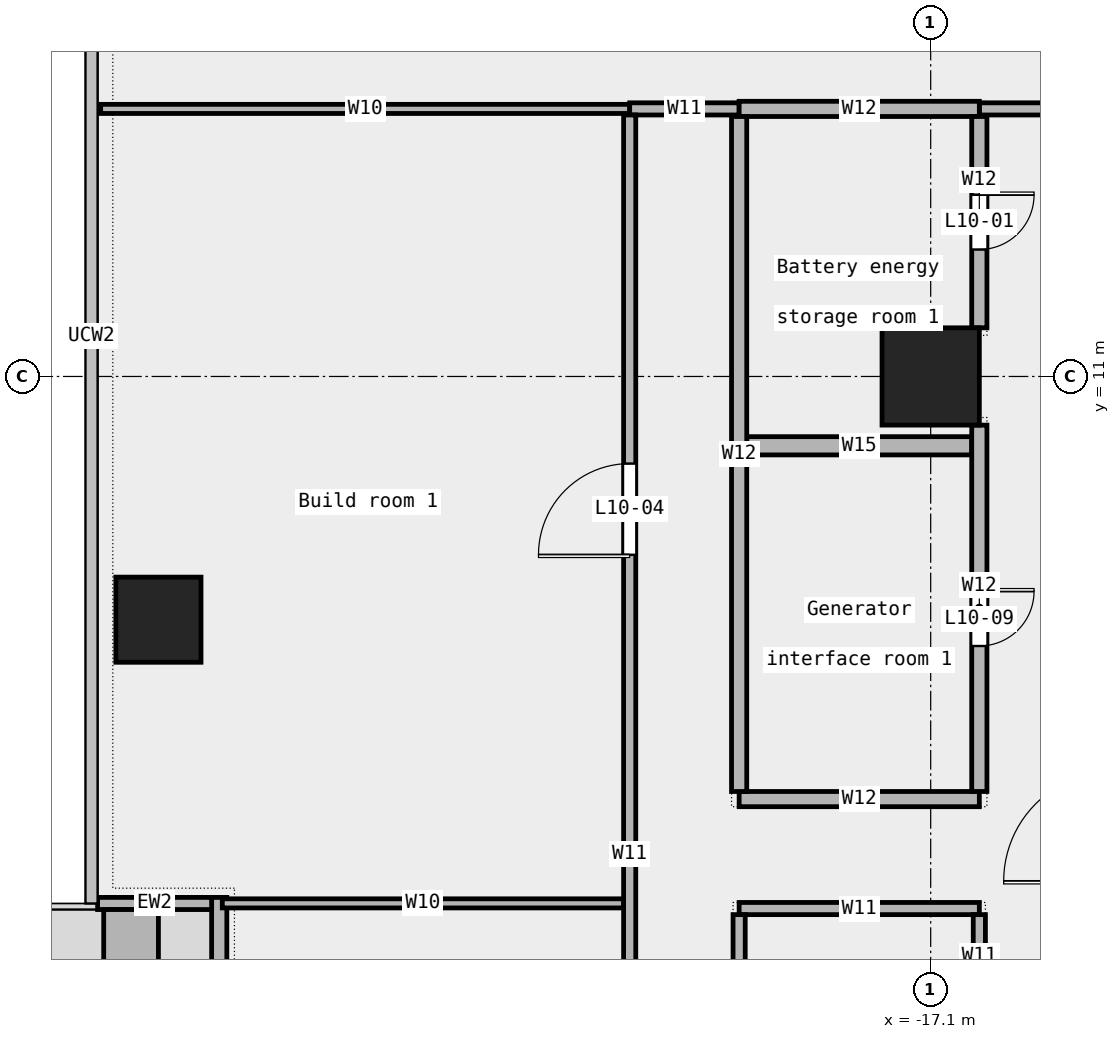
"""IFC4 building model, lengths in metres.
Left out: names, types, materials, properties, quantities, classifications, styles, units other than length and angle.
Written with IfcOpenShell. Run it as: python <this file> out.ifc"""

import sys

from ifc_helpers import new_model, si_unit, direction, frame, frame_2d, origin, origin_2d, place, context, subcontext, project, spatial, rectangle, extrude, element, fill, save


model = new_model("IFC4")
c1 = context("Model", 3, precision=1e-05, world=origin(), true_north=direction((0.0, 1.0)))
c2 = subcontext(c1, "Body", "Model", "MODEL_VIEW")
j1 = project(units=[si_unit("LENGTHUNIT", "METRE"), si_unit("PLANEANGLEUNIT", "RADIAN")], contexts=[c1])
p1 = place(None, origin())
s1 = spatial("IfcSite", under=j1, at=p1, CompositionType="ELEMENT")
p2 = place(p1, origin())
s2 = spatial("IfcBuilding", under=s1, at=p2, CompositionType="ELEMENT")
p3 = place(p2, frame((0.0, 0.0, 55.0)))
s3 = spatial("IfcBuildingStorey", under=s2, at=p3, CompositionType="ELEMENT", Elevation=55.0)
p4 = place(p3, frame((-29.8, 7.0, 0.0), z_axis=(0.0, 0.0, 1.0), x_axis=(1.0, 0.0, 0.0)))
e1 = element("IfcColumn", 1, at=p4, inside=s3, PredefinedType="COLUMN", context=c2, shape_type="SweptSolid", body=[
    extrude(rectangle(XDim=1.4, YDim=1.4, at=origin_2d()), origin(), (0.0, 0.0, 1.0), 4.35),
])
p5 = place(p3, frame((-17.1, 11.0, 0.0), z_axis=(0.0, 0.0, 1.0), x_axis=(1.0, 0.0, 0.0)))
e2 = element("IfcColumn", 2, at=p5, inside=s3, PredefinedType="COLUMN", context=c2, shape_type="SweptSolid", body=[
    extrude(rectangle(XDim=1.6, YDim=1.6, at=origin_2d()), origin(), (0.0, 0.0, 1.0), 4.35),
])
p6 = place(p3, frame((-28.8, 2.433, 0.0), z_axis=(0.0, 0.0, 1.0), x_axis=(0.0, -1.0, 0.0)))
e3 = element("IfcWall", 3, at=p6, inside=s3, PredefinedType="STANDARD", context=c2, shape_type="SweptSolid", body=[
    extrude(rectangle(XDim=14.2, YDim=0.25, at=frame_2d((7.1, 0.0))), origin(), (0.0, 0.0, 1.0), 4.35),
])
p7 = place(p6, frame((1.75, 0.0, 0.45)))
e4 = element("IfcOpeningElement", 4, at=p7, cuts=e3, PredefinedType="OPENING", context=c2, shape_type="SweptSolid", body=[
    extrude(rectangle(XDim=1.5, YDim=3.0, at=frame_2d((0.75, 1.5))), frame((0.0, 0.137, 0.0), z_axis=(0.0, -1.0, 0.0), x_axis=(1.0, 0.0, 0.0)), (0.0, 0.0, 1.0), 0.274),
])
p8 = place(p6, frame((6.25, 0.0, 0.0)))
e5 = element("IfcOpeningElement", 5, at=p8, cuts=e3, PredefinedType="OPENING", context=c2, shape_type="SweptSolid", body=[
    extrude(rectangle(XDim=1.8, YDim=2.4, at=frame_2d((0.9, 1.2))), frame((0.0, 0.137, 0.0), z_axis=(0.0, -1.0, 0.0), x_axis=(1.0, 0.0, 0.0)), (0.0, 0.0, 1.0), 0.274),
])
p9 = place(p6, frame((11.0, 0.0, 0.45)))
e6 = element("IfcOpeningElement", 6, at=p9, cuts=e3, PredefinedType="OPENING", context=c2, shape_type="SweptSolid", body=[
    extrude(rectangle(XDim=1.5, YDim=3.0, at=frame_2d((0.75, 1.5))), frame((0.0, 0.137, 0.0), z_axis=(0.0, -1.0, 0.0), x_axis=(1.0, 0.0, 0.0)), (0.0, 0.0, 1.0), 0.274),
])
p10 = place(p3, frame((-30.8, 2.333, 0.0), z_axis=(0.0, 0.0, 1.0), x_axis=(1.0, 0.0, 0.0)))
e7 = element("IfcWall", 7, at=p10, inside=s3, PredefinedType="STANDARD", context=c2, shape_type="SweptSolid", body=[
    extrude(rectangle(XDim=1.875, YDim=0.2, at=frame_2d((0.938, 0.0))), origin(), (0.0, 0.0, 1.0), 4.35),
])
p11 = place(p3, frame((-30.25, 2.233, 0.0), z_axis=(0.0, 0.0, 1.0), x_axis=(0.0, -1.0, 0.0)))
e8 = element("IfcWall", 8, at=p11, inside=s3, PredefinedType="STANDARD", context=c2, shape_type="SweptSolid", body=[
    extrude(rectangle(XDim=3.6, YDim=0.9, at=frame_2d((1.8, 0.0))), origin(), (0.0, 0.0, 1.0), 0.7),
])
p12 = place(p3, frame((-20.25, 2.25, 0.0), z_axis=(0.0, 0.0, 1.0), x_axis=(1.0, 0.0, 0.0)))
e9 = element("IfcWall", 9, at=p12, inside=s3, PredefinedType="PARTITIONING", context=c2, shape_type="SweptSolid", body=[
    extrude(rectangle(XDim=3.95, YDim=0.2, at=frame_2d((1.975, 0.0))), origin(), (0.0, 0.0, 1.0), 4.35),
])
p13 = place(p3, frame((-28.75, 2.335, 0.0), z_axis=(0.0, 0.0, 1.0), x_axis=(1.0, 0.0, 0.0)))
e10 = element("IfcWall", 10, at=p13, inside=s3, PredefinedType="PARTITIONING", context=c2, shape_type="SweptSolid", body=[
    extrude(rectangle(XDim=6.6, YDim=0.15, at=frame_2d((3.3, 0.0))), origin(), (0.0, 0.0, 1.0), 4.35),
])
p14 = place(p3, frame((-20.25, 4.05, 0.0), z_axis=(0.0, 0.0, 1.0), x_axis=(1.0, 0.0, 0.0)))
e11 = element("IfcWall", 11, at=p14, inside=s3, PredefinedType="PARTITIONING", context=c2, shape_type="SweptSolid", body=[
    extrude(rectangle(XDim=3.95, YDim=0.25, at=frame_2d((1.975, 0.0))), origin(), (0.0, 0.0, 1.0), 4.35),
])
p15 = place(p3, frame((-20.125, 9.86, 0.0), z_axis=(0.0, 0.0, 1.0), x_axis=(1.0, 0.0, 0.0)))
e12 = element("IfcWall", 12, at=p15, inside=s3, PredefinedType="PARTITIONING", context=c2, shape_type="SweptSolid", body=[
    extrude(rectangle(XDim=3.7, YDim=0.3, at=frame_2d((1.85, 0.0))), origin(), (0.0, 0.0, 1.0), 4.35),
])
p16 = place(p3, frame((-30.75, 15.4, 0.0), z_axis=(0.0, 0.0, 1.0), x_axis=(1.0, 0.0, 0.0)))
e13 = element("IfcWall", 13, at=p16, inside=s3, PredefinedType="PARTITIONING", context=c2, shape_type="SweptSolid", body=[
    extrude(rectangle(XDim=8.7, YDim=0.15, at=frame_2d((4.35, 0.0))), origin(), (0.0, 0.0, 1.0), 4.35),
])
p17 = place(p3, frame((-22.05, 15.4, 0.0), z_axis=(0.0, 0.0, 1.0), x_axis=(1.0, 0.0, 0.0)))
e14 = element("IfcWall", 14, at=p17, inside=s3, PredefinedType="PARTITIONING", context=c2, shape_type="SweptSolid", body=[
    extrude(rectangle(XDim=1.8, YDim=0.2, at=frame_2d((0.9, 0.0))), origin(), (0.0, 0.0, 1.0), 4.35),
])
p18 = place(p3, frame((-16.3, 15.4, 0.0), z_axis=(0.0, 0.0, 1.0), x_axis=(1.0, 0.0, 0.0)))
e15 = element("IfcWall", 15, at=p18, inside=s3, PredefinedType="PARTITIONING", context=c2, shape_type="SweptSolid", body=[
    extrude(rectangle(XDim=6.115, YDim=0.2, at=frame_2d((3.058, 0.0))), origin(), (0.0, 0.0, 1.0), 4.35),
])
p19 = place(p18, frame((2.157, 0.0, 0.0)))
e16 = element("IfcOpeningElement", 16, at=p19, cuts=e15, PredefinedType="OPENING", context=c2, shape_type="SweptSolid", body=[
    extrude(rectangle(XDim=1.8, YDim=2.1, at=frame_2d((0.9, 1.05))), frame((0.0, 0.112, 0.0), z_axis=(0.0, -1.0, 0.0), x_axis=(1.0, 0.0, 0.0)), (0.0, 0.0, 1.0), 0.224),
])
p20 = place(p3, frame((-20.25, 15.4, 0.0), z_axis=(0.0, 0.0, 1.0), x_axis=(1.0, 0.0, 0.0)))
e17 = element("IfcWall", 17, at=p20, inside=s3, PredefinedType="PARTITIONING", context=c2, shape_type="SweptSolid", body=[
    extrude(rectangle(XDim=3.95, YDim=0.25, at=frame_2d((1.975, 0.0))), origin(), (0.0, 0.0, 1.0), 4.35),
])
p21 = place(p3, frame((-22.05, -9.0, 0.0), z_axis=(0.0, 0.0, 1.0), x_axis=(0.0, 1.0, 0.0)))
e18 = element("IfcWall", 18, at=p21, inside=s3, PredefinedType="PARTITIONING", context=c2, shape_type="SweptSolid", body=[
    extrude(rectangle(XDim=24.3, YDim=0.2, at=frame_2d((12.15, 0.0))), origin(), (0.0, 0.0, 1.0), 4.35),
])
p22 = place(p21, frame((17.067, 0.0, 0.0)))
e19 = element("IfcOpeningElement", 19, at=p22, cuts=e18, PredefinedType="OPENING", context=c2, shape_type="SweptSolid", body=[
    extrude(rectangle(XDim=1.5, YDim=2.1, at=frame_2d((0.75, 1.05))), frame((0.0, 0.112, 0.0), z_axis=(0.0, -1.0, 0.0), x_axis=(1.0, 0.0, 0.0)), (0.0, 0.0, 1.0), 0.224),
])
p23 = place(p21, frame((4.768, 0.0, 0.0)))
e20 = element("IfcOpeningElement", 20, at=p23, cuts=e18, PredefinedType="OPENING", context=c2, shape_type="SweptSolid", body=[
    extrude(rectangle(XDim=1.8, YDim=2.1, at=frame_2d((0.9, 1.05))), frame((0.0, 0.112, 0.0), z_axis=(0.0, -1.0, 0.0), x_axis=(1.0, 0.0, 0.0)), (0.0, 0.0, 1.0), 0.224),
])
p24 = place(p3, frame((-20.25, -9.0, 0.0), z_axis=(0.0, 0.0, 1.0), x_axis=(0.0, 1.0, 0.0)))
e21 = element("IfcWall", 21, at=p24, inside=s3, PredefinedType="PARTITIONING", context=c2, shape_type="SweptSolid", body=[
    extrude(rectangle(XDim=11.15, YDim=0.2, at=frame_2d((5.575, 0.0))), origin(), (0.0, 0.0, 1.0), 4.35),
])
p25 = place(p3, frame((-20.25, 4.175, 0.0), z_axis=(0.0, 0.0, 1.0), x_axis=(0.0, 1.0, 0.0)))
e22 = element("IfcWall", 22, at=p25, inside=s3, PredefinedType="PARTITIONING", context=c2, shape_type="SweptSolid", body=[
    extrude(rectangle(XDim=11.1, YDim=0.25, at=frame_2d((5.55, 0.0))), origin(), (0.0, 0.0, 1.0), 4.35),
])
p26 = place(p3, frame((-16.3, 0.8, 0.0), z_axis=(0.0, 0.0, 1.0), x_axis=(0.0, 1.0, 0.0)))
e23 = element("IfcWall", 23, at=p26, inside=s3, PredefinedType="PARTITIONING", context=c2, shape_type="SweptSolid", body=[
    extrude(rectangle(XDim=1.35, YDim=0.2, at=frame_2d((0.675, 0.0))), origin(), (0.0, 0.0, 1.0), 4.35),
])
p27 = place(p3, frame((-16.3, 4.175, 0.0), z_axis=(0.0, 0.0, 1.0), x_axis=(0.0, 1.0, 0.0)))
e24 = element("IfcWall", 24, at=p27, inside=s3, PredefinedType="PARTITIONING", context=c2, shape_type="SweptSolid", body=[
    extrude(rectangle(XDim=6.025, YDim=0.25, at=frame_2d((3.012, 0.0))), origin(), (0.0, 0.0, 1.0), 4.35),
])
p28 = place(p27, frame((2.393, 0.0, 0.0)))
e25 = element("IfcOpeningElement", 25, at=p28, cuts=e24, PredefinedType="OPENING", context=c2, shape_type="SweptSolid", body=[
    extrude(rectangle(XDim=0.9, YDim=2.1, at=frame_2d((0.45, 1.05))), frame((0.0, 0.137, 0.0), z_axis=(0.0, -1.0, 0.0), x_axis=(1.0, 0.0, 0.0)), (0.0, 0.0, 1.0), 0.274),
])
p29 = place(p3, frame((-16.3, 11.8, 0.0), z_axis=(0.0, 0.0, 1.0), x_axis=(0.0, 1.0, 0.0)))
e26 = element("IfcWall", 26, at=p29, inside=s3, PredefinedType="PARTITIONING", context=c2, shape_type="SweptSolid", body=[
    extrude(rectangle(XDim=3.475, YDim=0.25, at=frame_2d((1.737, 0.0))), origin(), (0.0, 0.0, 1.0), 4.35),
])
p30 = place(p29, frame((1.288, 0.0, 0.0)))
e27 = element("IfcOpeningElement", 27, at=p30, cuts=e26, PredefinedType="OPENING", context=c2, shape_type="SweptSolid", body=[
    extrude(rectangle(XDim=0.9, YDim=2.1, at=frame_2d((0.45, 1.05))), frame((0.0, 0.137, 0.0), z_axis=(0.0, -1.0, 0.0), x_axis=(1.0, 0.0, 0.0)), (0.0, 0.0, 1.0), 0.274),
])
p31 = place(p30, origin())
e28 = element("IfcDoor", 28, at=p31, inside=s3, OperationType="SINGLE_SWING_LEFT", PredefinedType="DOOR", context=c2, shape_type="SweptSolid", body=[
    extrude(rectangle(XDim=0.9, YDim=2.1, at=frame_2d((0.45, 1.05))), frame((0.0, 0.025, 0.0), z_axis=(0.0, -1.0, 0.0), x_axis=(1.0, 0.0, 0.0)), (0.0, 0.0, 1.0), 0.05),
])
fill(e27, e28)
p32 = place(p22, origin())
e29 = element("IfcDoor", 29, at=p32, inside=s3, OperationType="DOUBLE_DOOR_SINGLE_SWING", PredefinedType="DOOR", context=c2, shape_type="SweptSolid", body=[
    extrude(rectangle(XDim=1.5, YDim=2.1, at=frame_2d((0.75, 1.05))), frame((0.0, 0.025, 0.0), z_axis=(0.0, -1.0, 0.0), x_axis=(1.0, 0.0, 0.0)), (0.0, 0.0, 1.0), 0.05),
])
fill(e19, e29)
p33 = place(p28, origin())
e30 = element("IfcDoor", 30, at=p33, inside=s3, OperationType="SINGLE_SWING_LEFT", PredefinedType="DOOR", context=c2, shape_type="SweptSolid", body=[
    extrude(rectangle(XDim=0.9, YDim=2.1, at=frame_2d((0.45, 1.05))), frame((0.0, 0.025, 0.0), z_axis=(0.0, -1.0, 0.0), x_axis=(1.0, 0.0, 0.0)), (0.0, 0.0, 1.0), 0.05),
])
fill(e25, e30)
save(model, sys.argv[1])
